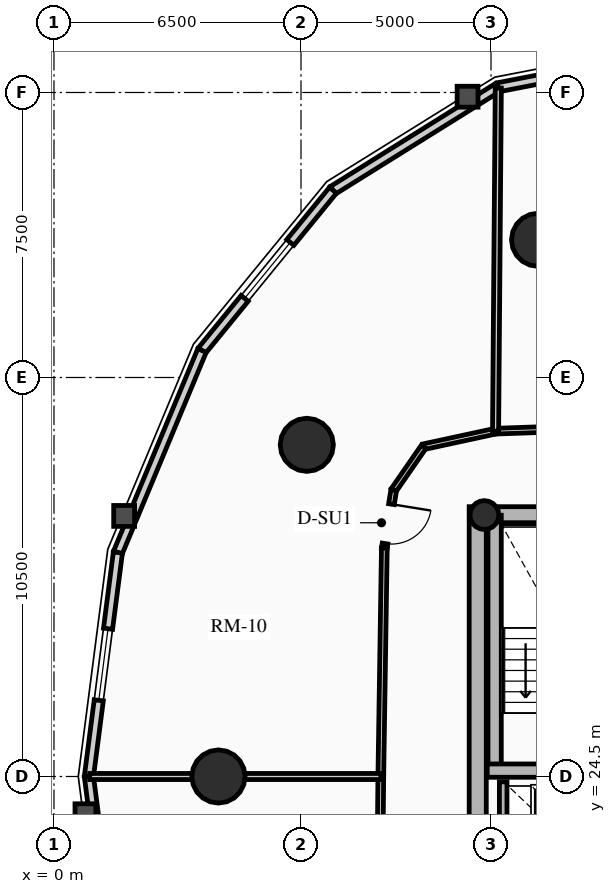
"""IFC4 building model, lengths in metres.
Left out: names, types, materials, properties, quantities, classifications, styles, units other than length and angle.
Written with IfcOpenShell. Run it as: python <this file> out.ifc"""

import sys

from ifc_helpers import new_model, si_unit, direction, frame, frame_2d, origin, origin_2d, place, context, subcontext, project, spatial, rectangle, circle, hollow_circle, extrude, source, transform, mapped, element, fill, save


model = new_model("IFC4")
c1 = context("Model", 3, precision=1e-05, world=origin(), true_north=direction((0.0, 1.0)))
c2 = subcontext(c1, "Body", "Model", "MODEL_VIEW")
j1 = project(units=[si_unit("LENGTHUNIT", "METRE"), si_unit("PLANEANGLEUNIT", "RADIAN")], contexts=[c1])
p1 = place(None, origin())
s1 = spatial("IfcSite", under=j1, at=p1, CompositionType="ELEMENT")
p2 = place(p1, origin())
s2 = spatial("IfcBuilding", under=s1, at=p2, CompositionType="ELEMENT")
p3 = place(p2, frame((0.0, 0.0, 73.06)))
s3 = spatial("IfcBuildingStorey", under=s2, at=p3, CompositionType="ELEMENT", Elevation=73.06)
p4 = place(p3, frame((11.15, 17.4, 0.0), z_axis=(0.0, 0.0, 1.0), x_axis=(0.0, 1.0, 0.0)))
e1 = element("IfcWall", 1, at=p4, inside=s3, PredefinedType="SHEAR", context=c2, shape_type="SweptSolid", body=[
    extrude(rectangle(XDim=14.2, YDim=0.45, at=frame_2d((7.1, 0.0))), origin(), (0.0, 0.0, 1.0), 2.91),
])
p5 = place(p3, frame((11.15, 31.375, 0.0), z_axis=(0.0, 0.0, 1.0), x_axis=(1.0, 0.0, 0.0)))
e2 = element("IfcWall", 2, at=p5, inside=s3, PredefinedType="SHEAR", context=c2, shape_type="SweptSolid", body=[
    extrude(rectangle(XDim=10.7, YDim=0.45, at=frame_2d((5.35, 0.0))), origin(), (0.0, 0.0, 1.0), 2.91),
])
m1 = source(origin(), c2, "Body", "SweptSolid", [
    extrude(rectangle(XDim=1.5, YDim=2.02, at=frame_2d((0.75, 1.01))), frame((0.0, 0.235, 0.0), z_axis=(0.0, -1.0, 0.0), x_axis=(1.0, 0.0, 0.0)), (0.0, 0.0, 1.0), 0.47),
])
p6 = place(p5, frame((4.6, 0.0, 0.0)))
e3 = element("IfcOpeningElement", 3, at=p6, cuts=e2, PredefinedType="OPENING", context=c2, shape_type="MappedRepresentation", body=[
    mapped(m1, transform((0.0, 0.0, 0.0), x_axis=(1.0, 0.0, 0.0), y_axis=(0.0, 1.0, 0.0), z_axis=(0.0, 0.0, 1.0), scale=1.0)),
])
p7 = place(p3, frame((11.595, 24.655, 0.0), z_axis=(0.0, 0.0, 1.0), x_axis=(0.0, 1.0, 0.0)))
e4 = element("IfcWall", 4, at=p7, inside=s3, PredefinedType="SHEAR", context=c2, shape_type="SweptSolid", body=[
    extrude(rectangle(XDim=6.72, YDim=0.35, at=frame_2d((3.36, 0.0))), origin(), (0.0, 0.0, 1.0), 2.91),
])
p8 = place(p3, frame((11.4, 24.655, 0.0), z_axis=(0.0, 0.0, 1.0), x_axis=(1.0, 0.0, 0.0)))
e5 = element("IfcWall", 5, at=p8, inside=s3, PredefinedType="SHEAR", context=c2, shape_type="SweptSolid", body=[
    extrude(rectangle(XDim=3.285, YDim=0.35, at=frame_2d((1.643, 0.0))), origin(), (0.0, 0.0, 1.0), 2.91),
])
p9 = place(p3, frame((11.325, 31.38, 0.0), z_axis=(0.0, 0.0, 1.0), x_axis=(1.0, 0.0, 0.0)))
e6 = element("IfcColumn", 6, at=p9, inside=s3, PredefinedType="COLUMN", context=c2, shape_type="SweptSolid", body=[
    extrude(hollow_circle(Radius=0.38, WallThickness=0.032, at=origin_2d()), origin(), (0.0, 0.0, 1.0), 2.91),
])
for number, where, z_axis, x_axis in (
    (7, (12.739, 38.623, 0.0), (0.0, 0.0, 1.0), (1.0, 0.0, 0.0)),
    (8, (6.653, 33.229, 0.0), (0.0, 0.0, 1.0), (1.0, 0.0, 0.0)),
    (9, (4.328, 24.5, 0.0), (0.0, 0.0, 1.0), (1.0, 0.0, 0.0)),
):
    element("IfcColumn", number, at=place(p3, frame(where, z_axis=z_axis, x_axis=x_axis)), inside=s3, PredefinedType="USERDEFINED", context=c2, shape_type="SweptSolid", body=[
        extrude(circle(Radius=0.7, at=origin_2d()), origin(), (0.0, 0.0, 1.0), 2.91),
    ])
p10 = place(p3, frame((11.685, 42.637, 0.0), z_axis=(0.0, 0.0, 1.0), x_axis=(0.981723785992, 0.190311344954, 0.0)))
e10 = element("IfcWall", 10, at=p10, inside=s3, PredefinedType="SOLIDWALL", context=c2, shape_type="SweptSolid", body=[
    extrude(rectangle(XDim=4.904, YDim=0.24, at=frame_2d((2.452, 0.0))), origin(), (0.0, 0.0, 1.0), 2.179),
])
m2 = source(origin(), c2, "Body", "SweptSolid", [
    extrude(rectangle(XDim=2.2, YDim=1.35, at=frame_2d((1.1, 0.675))), frame((0.0, 0.13, 0.0), z_axis=(0.0, -1.0, 0.0), x_axis=(1.0, 0.0, 0.0)), (0.0, 0.0, 1.0), 0.26),
])
p11 = place(p10, frame((1.352, 0.0, 0.65)))
e11 = element("IfcOpeningElement", 11, at=p11, cuts=e10, PredefinedType="OPENING", context=c2, shape_type="MappedRepresentation", body=[
    mapped(m2, transform((0.0, 0.0, 0.0), x_axis=(1.0, 0.0, 0.0), y_axis=(0.0, 1.0, 0.0), z_axis=(0.0, 0.0, 1.0), scale=1.0)),
])
p12 = place(p3, frame((7.342, 39.928, 0.0), z_axis=(0.0, 0.0, 1.0), x_axis=(0.848520380187, 0.529162701263, 0.0)))
e12 = element("IfcWall", 12, at=p12, inside=s3, PredefinedType="SOLIDWALL", context=c2, shape_type="SweptSolid", body=[
    extrude(rectangle(XDim=5.119, YDim=0.24, at=frame_2d((2.56, 0.0))), origin(), (0.0, 0.0, 1.0), 2.179),
])
p13 = place(p3, frame((3.895, 35.709, 0.0), z_axis=(0.0, 0.0, 1.0), x_axis=(0.632700781152, 0.77439635945, 0.0)))
e13 = element("IfcWall", 13, at=p13, inside=s3, PredefinedType="SOLIDWALL", context=c2, shape_type="SweptSolid", body=[
    extrude(rectangle(XDim=5.448, YDim=0.24, at=frame_2d((2.724, 0.0))), origin(), (0.0, 0.0, 1.0), 2.179),
])
m3 = source(origin(), c2, "Body", "SweptSolid", [
    extrude(rectangle(XDim=1.9, YDim=1.35, at=frame_2d((0.95, 0.675))), frame((0.0, 0.13, 0.0), z_axis=(0.0, -1.0, 0.0), x_axis=(1.0, 0.0, 0.0)), (0.0, 0.0, 1.0), 0.26),
])
p14 = place(p13, frame((1.774, 0.0, 0.65)))
e14 = element("IfcOpeningElement", 14, at=p14, cuts=e13, PredefinedType="OPENING", context=c2, shape_type="MappedRepresentation", body=[
    mapped(m3, transform((0.0, 0.0, 0.0), x_axis=(1.0, 0.0, 0.0), y_axis=(0.0, 1.0, 0.0), z_axis=(0.0, 0.0, 1.0), scale=1.0)),
])
p15 = place(p3, frame((1.682, 30.393, 0.0), z_axis=(0.0, 0.0, 1.0), x_axis=(0.384344417632, 0.923189779317, 0.0)))
e15 = element("IfcWall", 15, at=p15, inside=s3, PredefinedType="SOLIDWALL", context=c2, shape_type="SweptSolid", body=[
    extrude(rectangle(XDim=5.758, YDim=0.24, at=frame_2d((2.879, 0.0))), origin(), (0.0, 0.0, 1.0), 2.179),
])
p16 = place(p3, frame((0.919, 24.5, 0.0), z_axis=(0.0, 0.0, 1.0), x_axis=(0.128351991996, 0.991728675672, 0.0)))
e16 = element("IfcWall", 16, at=p16, inside=s3, PredefinedType="SOLIDWALL", context=c2, shape_type="SweptSolid", body=[
    extrude(rectangle(XDim=5.942, YDim=0.24, at=frame_2d((2.971, 0.0))), origin(), (0.0, 0.0, 1.0), 2.179),
])
p17 = place(p16, frame((2.021, 0.0, 0.65)))
e17 = element("IfcOpeningElement", 17, at=p17, cuts=e16, PredefinedType="OPENING", context=c2, shape_type="MappedRepresentation", body=[
    mapped(m3, transform((0.0, 0.0, 0.0), x_axis=(1.0, 0.0, 0.0), y_axis=(0.0, 1.0, 0.0), z_axis=(0.0, 0.0, 1.0), scale=1.0)),
])
p18 = place(p3, frame((1.682, 18.607, 0.0), z_axis=(0.0, 0.0, 1.0), x_axis=(-0.128351991996, 0.991728675672, 0.0)))
e18 = element("IfcWall", 18, at=p18, inside=s3, PredefinedType="SOLIDWALL", context=c2, shape_type="SweptSolid", body=[
    extrude(rectangle(XDim=5.942, YDim=0.24, at=frame_2d((2.971, 0.0))), origin(), (0.0, 0.0, 1.0), 2.179),
])
p19 = place(p3, frame((11.82, 21.92, 0.0), z_axis=(0.0, 0.0, 1.0), x_axis=(0.0, 1.0, 0.0)))
e19 = element("IfcWall", 19, at=p19, inside=s3, PredefinedType="SHEAR", context=c2, shape_type="SweptSolid", body=[
    extrude(rectangle(XDim=2.44, YDim=0.2, at=frame_2d((1.22, 0.0))), origin(), (0.0, 0.0, 1.0), 2.91),
])
p20 = place(p3, frame((18.143, 33.81, 0.0), z_axis=(0.0, 0.0, 1.0), x_axis=(-0.999423023908, -0.033964971394, 0.0)))
e20 = element("IfcWall", 20, at=p20, inside=s3, PredefinedType="PARTITIONING", context=c2, shape_type="SweptSolid", body=[
    extrude(rectangle(XDim=6.527, YDim=0.15, at=frame_2d((3.263, 0.0))), origin(), (0.0, 0.0, 1.0), 2.225),
])
p21 = place(p3, frame((11.62, 33.588, 0.0), z_axis=(0.0, 0.0, 1.0), x_axis=(-0.977392314559, -0.211433827571, 0.0)))
e21 = element("IfcWall", 21, at=p21, inside=s3, PredefinedType="PARTITIONING", context=c2, shape_type="SweptSolid", body=[
    extrude(rectangle(XDim=1.934, YDim=0.15, at=frame_2d((0.967, 0.0))), origin(), (0.0, 0.0, 1.0), 2.225),
])
p22 = place(p3, frame((9.729, 33.179, 0.0), z_axis=(0.0, 0.0, 1.0), x_axis=(-0.569155068352, -0.822230203878, 0.0)))
e22 = element("IfcWall", 22, at=p22, inside=s3, PredefinedType="PARTITIONING", context=c2, shape_type="SweptSolid", body=[
    extrude(rectangle(XDim=1.387, YDim=0.15, at=frame_2d((0.694, 0.0))), origin(), (0.0, 0.0, 1.0), 2.225),
])
p23 = place(p3, frame((8.94, 32.038, 0.0), z_axis=(0.0, 0.0, 1.0), x_axis=(-0.159917336462, -0.987130409571, 0.0)))
e23 = element("IfcWall", 23, at=p23, inside=s3, PredefinedType="PARTITIONING", context=c2, shape_type="SweptSolid", body=[
    extrude(rectangle(XDim=1.547, YDim=0.15, at=frame_2d((0.773, 0.0))), origin(), (0.0, 0.0, 1.0), 2.225),
])
m4 = source(origin(), c2, "Body", "SweptSolid", [
    extrude(rectangle(XDim=1.05, YDim=2.015, at=frame_2d((0.525, 1.007))), frame((0.0, 0.085, 0.0), z_axis=(0.0, -1.0, 0.0), x_axis=(1.0, 0.0, 0.0)), (0.0, 0.0, 1.0), 0.17),
])
p24 = place(p23, frame((0.377, 0.0, 0.0)))
e24 = element("IfcOpeningElement", 24, at=p24, cuts=e23, PredefinedType="OPENING", context=c2, shape_type="MappedRepresentation", body=[
    mapped(m4, transform((0.0, 0.0, 0.0), x_axis=(1.0, 0.0, 0.0), y_axis=(0.0, 1.0, 0.0), z_axis=(0.0, 0.0, 1.0), scale=1.0)),
])
p25 = place(p3, frame((8.693, 30.512, 0.0), z_axis=(0.0, 0.0, 1.0), x_axis=(-0.015389665197, -0.99988157209, 0.0)))
e25 = element("IfcWall", 25, at=p25, inside=s3, PredefinedType="PARTITIONING", context=c2, shape_type="SweptSolid", body=[
    extrude(rectangle(XDim=6.012, YDim=0.15, at=frame_2d((3.006, 0.0))), origin(), (0.0, 0.0, 1.0), 2.655),
])
p26 = place(p3, frame((8.6, 24.5, 0.0), z_axis=(0.0, 0.0, 1.0), x_axis=(-0.010076760723, -0.999949228158, 0.0)))
e26 = element("IfcWall", 26, at=p26, inside=s3, PredefinedType="PARTITIONING", context=c2, shape_type="SweptSolid", body=[
    extrude(rectangle(XDim=6.13, YDim=0.15, at=frame_2d((3.065, 0.0))), origin(), (0.0, 0.0, 1.0), 2.225),
])
p27 = place(p3, frame((11.62, 33.588, 0.0), z_axis=(0.0, 0.0, 1.0), x_axis=(0.007921667836, 0.999968623097, 0.0)))
e27 = element("IfcWall", 27, at=p27, inside=s3, PredefinedType="PARTITIONING", context=c2, shape_type="SweptSolid", body=[
    extrude(rectangle(XDim=9.03, YDim=0.16, at=frame_2d((4.515, 0.0))), origin(), (0.0, 0.0, 1.0), 2.179),
])
p28 = place(p3, frame((8.6, 24.5, 0.0), z_axis=(0.0, 0.0, 1.0), x_axis=(-1.0, 0.0, 0.0)))
e28 = element("IfcWall", 28, at=p28, inside=s3, PredefinedType="PARTITIONING", context=c2, shape_type="SweptSolid", body=[
    extrude(rectangle(XDim=7.661, YDim=0.16, at=frame_2d((3.831, 0.0))), origin(), (0.0, 0.0, 1.0), 2.179),
])
m5 = source(origin(), c2, "Body", "SweptSolid", [
    extrude(rectangle(XDim=1.9, YDim=1.35, at=frame_2d((0.95, 0.675))), frame((0.0, 0.03, 0.0), z_axis=(0.0, -1.0, 0.0), x_axis=(1.0, 0.0, 0.0)), (0.0, 0.0, 1.0), 0.06),
])
p29 = place(p14, origin())
e29 = element("IfcWindow", 29, at=p29, inside=s3, PartitioningType="DOUBLE_PANEL_VERTICAL", PredefinedType="WINDOW", context=c2, shape_type="MappedRepresentation", body=[
    mapped(m5, transform((0.0, 0.0, 0.0), x_axis=(1.0, 0.0, 0.0), y_axis=(0.0, 1.0, 0.0), z_axis=(0.0, 0.0, 1.0), scale=1.0)),
])
fill(e14, e29)
p30 = place(p17, origin())
e30 = element("IfcWindow", 30, at=p30, inside=s3, PartitioningType="DOUBLE_PANEL_VERTICAL", PredefinedType="WINDOW", context=c2, shape_type="MappedRepresentation", body=[
    mapped(m5, transform((0.0, 0.0, 0.0), x_axis=(1.0, 0.0, 0.0), y_axis=(0.0, 1.0, 0.0), z_axis=(0.0, 0.0, 1.0), scale=1.0)),
])
fill(e17, e30)
m6 = source(origin(), c2, "Body", "SweptSolid", [
    extrude(rectangle(XDim=1.05, YDim=2.015, at=frame_2d((0.525, 1.007))), frame((0.0, 0.025, 0.0), z_axis=(0.0, -1.0, 0.0), x_axis=(1.0, 0.0, 0.0)), (0.0, 0.0, 1.0), 0.05),
])
p31 = place(p24, origin())
e31 = element("IfcDoor", 31, at=p31, inside=s3, OperationType="SINGLE_SWING_LEFT", PredefinedType="DOOR", context=c2, shape_type="MappedRepresentation", body=[
    mapped(m6, transform((0.0, 0.0, 0.0), x_axis=(1.0, 0.0, 0.0), y_axis=(0.0, 1.0, 0.0), z_axis=(0.0, 0.0, 1.0), scale=1.0)),
])
fill(e24, e31)
save(model, sys.argv[1])
